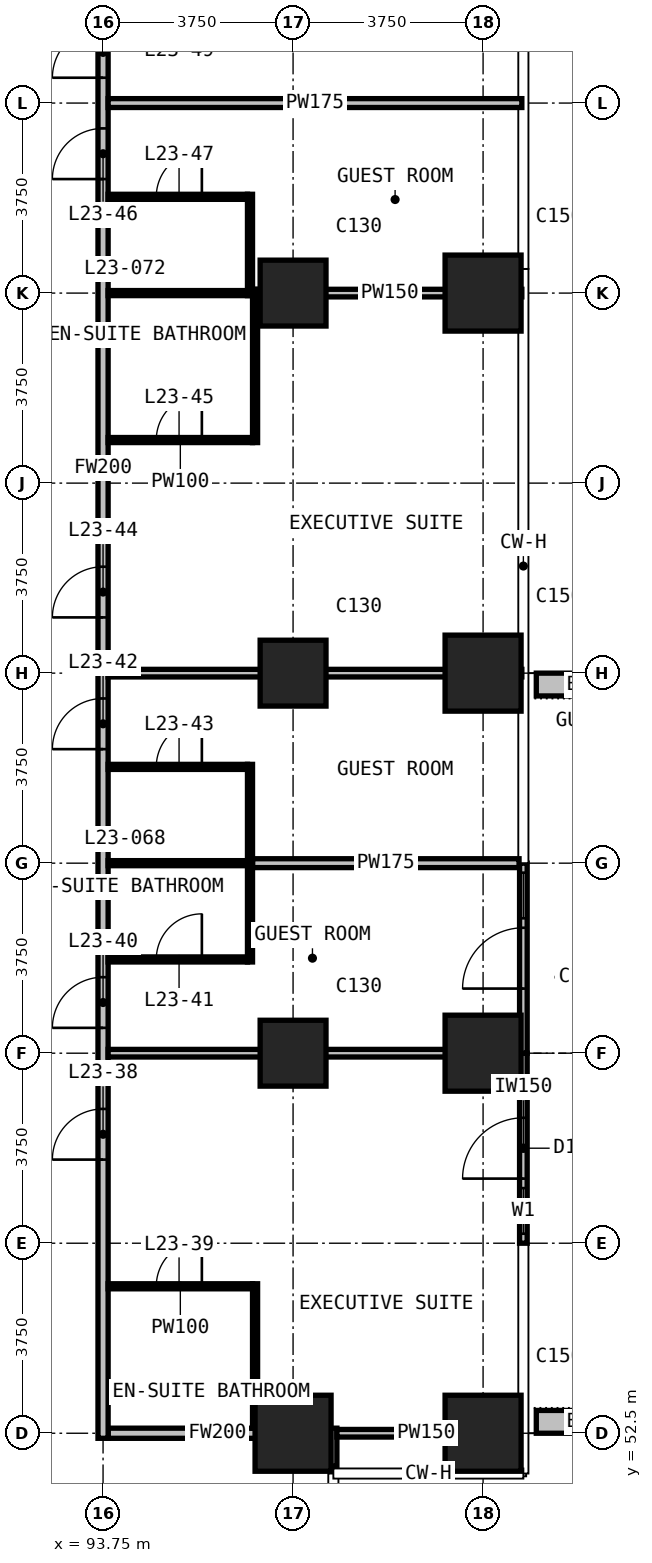
"""IFC4 building model, lengths in metres.
Left out: names, types, materials, properties, quantities, classifications, styles, units other than length and angle.
Written with IfcOpenShell. Run it as: python <this file> out.ifc"""

import sys

from ifc_helpers import new_model, si_unit, direction, frame, frame_2d, origin, origin_2d, place, context, subcontext, project, spatial, rectangle, extrude, element, fill, save


model = new_model("IFC4")
c1 = context("Model", 3, precision=1e-05, world=origin(), true_north=direction((0.0, 1.0)))
c2 = subcontext(c1, "Body", "Model", "MODEL_VIEW")
j1 = project(units=[si_unit("LENGTHUNIT", "METRE"), si_unit("PLANEANGLEUNIT", "RADIAN")], contexts=[c1])
p1 = place(None, origin())
s1 = spatial("IfcSite", under=j1, at=p1, CompositionType="ELEMENT")
p2 = place(p1, origin())
s2 = spatial("IfcBuilding", under=s1, at=p2, CompositionType="ELEMENT")
p3 = place(p2, frame((0.0, 0.0, 95.6)))
s3 = spatial("IfcBuildingStorey", under=s2, at=p3, CompositionType="ELEMENT", Elevation=95.6)
p4 = place(p3, frame((97.5, 52.5, 0.0), z_axis=(0.0, 0.0, 1.0), x_axis=(1.0, 0.0, 0.0)))
e1 = element("IfcColumn", 1, at=p4, inside=s3, PredefinedType="COLUMN", context=c2, shape_type="SweptSolid", body=[
    extrude(rectangle(XDim=1.5, YDim=1.5, at=origin_2d()), origin(), (0.0, 0.0, 1.0), 3.3),
])
for number, where, z_axis, x_axis in (
    (2, (97.5, 60.0, 0.0), (0.0, 0.0, 1.0), (1.0, 0.0, 0.0)),
    (3, (97.5, 67.5, 0.0), (0.0, 0.0, 1.0), (1.0, 0.0, 0.0)),
    (4, (97.5, 75.0, 0.0), (0.0, 0.0, 1.0), (1.0, 0.0, 0.0)),
):
    element("IfcColumn", number, at=place(p3, frame(where, z_axis=z_axis, x_axis=x_axis)), inside=s3, PredefinedType="COLUMN", context=c2, shape_type="SweptSolid", body=[
        extrude(rectangle(XDim=1.3, YDim=1.3, at=origin_2d()), origin(), (0.0, 0.0, 1.0), 3.3),
    ])
for number, where, z_axis, x_axis in (
    (5, (101.25, 52.5, 0.0), (0.0, 0.0, 1.0), (1.0, 0.0, 0.0)),
    (6, (101.25, 60.0, 0.0), (0.0, 0.0, 1.0), (1.0, 0.0, 0.0)),
    (7, (101.25, 67.5, 0.0), (0.0, 0.0, 1.0), (1.0, 0.0, 0.0)),
    (8, (101.25, 75.0, 0.0), (0.0, 0.0, 1.0), (1.0, 0.0, 0.0)),
):
    element("IfcColumn", number, at=place(p3, frame(where, z_axis=z_axis, x_axis=x_axis)), inside=s3, PredefinedType="COLUMN", context=c2, shape_type="SweptSolid", body=[
        extrude(rectangle(XDim=1.5, YDim=1.5, at=origin_2d()), origin(), (0.0, 0.0, 1.0), 3.3),
    ])
p5 = place(p3, frame((102.045, 56.25, 0.0), z_axis=(0.0, 0.0, 1.0), x_axis=(0.0, 1.0, 0.0)))
e9 = element("IfcWall", 9, at=p5, inside=s3, PredefinedType="SOLIDWALL", context=c2, shape_type="SweptSolid", body=[
    extrude(rectangle(XDim=3.75, YDim=0.15, at=frame_2d((1.875, 0.0))), origin(), (0.0, 0.0, 1.0), 3.0),
])
p6 = place(p5, frame((0.188, 0.0, 0.1)))
e10 = element("IfcOpeningElement", 10, at=p6, cuts=e9, PredefinedType="OPENING", context=c2, shape_type="SweptSolid", body=[
    extrude(rectangle(XDim=0.9, YDim=2.4, at=frame_2d((0.45, 1.2))), frame((0.0, 0.085, 0.0), z_axis=(0.0, -1.0, 0.0), x_axis=(1.0, 0.0, 0.0)), (0.0, 0.0, 1.0), 0.17),
])
p7 = place(p5, frame((1.275, 0.0, 0.0)))
e11 = element("IfcOpeningElement", 11, at=p7, cuts=e9, PredefinedType="OPENING", context=c2, shape_type="SweptSolid", body=[
    extrude(rectangle(XDim=1.2, YDim=2.4, at=frame_2d((0.6, 1.2))), frame((0.0, 0.085, 0.0), z_axis=(0.0, -1.0, 0.0), x_axis=(1.0, 0.0, 0.0)), (0.0, 0.0, 1.0), 0.17),
])
p8 = place(p3, frame((102.045, 60.0, 0.0), z_axis=(0.0, 0.0, 1.0), x_axis=(0.0, 1.0, 0.0)))
e12 = element("IfcWall", 12, at=p8, inside=s3, PredefinedType="SOLIDWALL", context=c2, shape_type="SweptSolid", body=[
    extrude(rectangle(XDim=3.75, YDim=0.15, at=frame_2d((1.875, 0.0))), origin(), (0.0, 0.0, 1.0), 3.0),
])
p9 = place(p8, frame((1.275, 0.0, 0.0)))
e13 = element("IfcOpeningElement", 13, at=p9, cuts=e12, PredefinedType="OPENING", context=c2, shape_type="SweptSolid", body=[
    extrude(rectangle(XDim=1.2, YDim=2.4, at=frame_2d((0.6, 1.2))), frame((0.0, 0.085, 0.0), z_axis=(0.0, -1.0, 0.0), x_axis=(1.0, 0.0, 0.0)), (0.0, 0.0, 1.0), 0.17),
])
p10 = place(p8, frame((2.663, 0.0, 0.1)))
e14 = element("IfcOpeningElement", 14, at=p10, cuts=e12, PredefinedType="OPENING", context=c2, shape_type="SweptSolid", body=[
    extrude(rectangle(XDim=0.9, YDim=2.4, at=frame_2d((0.45, 1.2))), frame((0.0, 0.085, 0.0), z_axis=(0.0, -1.0, 0.0), x_axis=(1.0, 0.0, 0.0)), (0.0, 0.0, 1.0), 0.17),
])
for number, where, z_axis, x_axis in (
    (15, (102.3, 52.725, 0.0), (0.0, 0.0, 1.0), (1.0, 0.0, 0.0)),
    (16, (102.3, 67.275, 0.0), (0.0, 0.0, 1.0), (1.0, 0.0, 0.0)),
):
    element("IfcWall", number, at=place(p3, frame(where, z_axis=z_axis, x_axis=x_axis)), inside=s3, PredefinedType="USERDEFINED", context=c2, shape_type="SweptSolid", body=[
        extrude(rectangle(XDim=2.35, YDim=0.45, at=frame_2d((1.175, 0.0))), origin(), (0.0, 0.0, 1.0), 1.1),
    ])
p11 = place(p3, frame((93.85, 52.5, 0.0), z_axis=(0.0, 0.0, 1.0), x_axis=(1.0, 0.0, 0.0)))
e17 = element("IfcWall", 17, at=p11, inside=s3, PredefinedType="PARTITIONING", context=c2, shape_type="SweptSolid", body=[
    extrude(rectangle(XDim=4.315, YDim=0.2, at=frame_2d((2.157, 0.0))), origin(), (0.0, 0.0, 1.0), 3.0),
])
p12 = place(p3, frame((93.75, 52.4, 0.0), z_axis=(0.0, 0.0, 1.0), x_axis=(0.0, 1.0, 0.0)))
e18 = element("IfcWall", 18, at=p12, inside=s3, PredefinedType="PARTITIONING", context=c2, shape_type="SweptSolid", body=[
    extrude(rectangle(XDim=38.31, YDim=0.2, at=frame_2d((19.155, 0.0))), origin(), (0.0, 0.0, 1.0), 3.0),
])
p13 = place(p12, frame((5.5, 0.0, 0.0)))
e19 = element("IfcOpeningElement", 19, at=p13, cuts=e18, PredefinedType="OPENING", context=c2, shape_type="SweptSolid", body=[
    extrude(rectangle(XDim=1.0, YDim=2.2, at=frame_2d((0.5, 1.1))), frame((0.0, 0.11, 0.0), z_axis=(0.0, -1.0, 0.0), x_axis=(1.0, 0.0, 0.0)), (0.0, 0.0, 1.0), 0.22),
])
p14 = place(p12, frame((8.1, 0.0, 0.0)))
e20 = element("IfcOpeningElement", 20, at=p14, cuts=e18, PredefinedType="OPENING", context=c2, shape_type="SweptSolid", body=[
    extrude(rectangle(XDim=1.0, YDim=2.2, at=frame_2d((0.5, 1.1))), frame((0.0, 0.11, 0.0), z_axis=(0.0, -1.0, 0.0), x_axis=(1.0, 0.0, 0.0)), (0.0, 0.0, 1.0), 0.22),
])
p15 = place(p12, frame((13.6, 0.0, 0.0)))
e21 = element("IfcOpeningElement", 21, at=p15, cuts=e18, PredefinedType="OPENING", context=c2, shape_type="SweptSolid", body=[
    extrude(rectangle(XDim=1.0, YDim=2.2, at=frame_2d((0.5, 1.1))), frame((0.0, 0.11, 0.0), z_axis=(0.0, -1.0, 0.0), x_axis=(1.0, 0.0, 0.0)), (0.0, 0.0, 1.0), 0.22),
])
p16 = place(p12, frame((16.2, 0.0, 0.0)))
e22 = element("IfcOpeningElement", 22, at=p16, cuts=e18, PredefinedType="OPENING", context=c2, shape_type="SweptSolid", body=[
    extrude(rectangle(XDim=1.0, YDim=2.2, at=frame_2d((0.5, 1.1))), frame((0.0, 0.11, 0.0), z_axis=(0.0, -1.0, 0.0), x_axis=(1.0, 0.0, 0.0)), (0.0, 0.0, 1.0), 0.22),
])
p17 = place(p12, frame((24.85, 0.0, 0.0)))
e23 = element("IfcOpeningElement", 23, at=p17, cuts=e18, PredefinedType="OPENING", context=c2, shape_type="SweptSolid", body=[
    extrude(rectangle(XDim=1.0, YDim=2.2, at=frame_2d((0.5, 1.1))), frame((0.0, 0.11, 0.0), z_axis=(0.0, -1.0, 0.0), x_axis=(1.0, 0.0, 0.0)), (0.0, 0.0, 1.0), 0.22),
])
p18 = place(p12, frame((26.85, 0.0, 0.0)))
e24 = element("IfcOpeningElement", 24, at=p18, cuts=e18, PredefinedType="OPENING", context=c2, shape_type="SweptSolid", body=[
    extrude(rectangle(XDim=1.0, YDim=2.2, at=frame_2d((0.5, 1.1))), frame((0.0, 0.11, 0.0), z_axis=(0.0, -1.0, 0.0), x_axis=(1.0, 0.0, 0.0)), (0.0, 0.0, 1.0), 0.22),
])
p19 = place(p12, frame((31.55, 0.0, 0.0)))
e25 = element("IfcOpeningElement", 25, at=p19, cuts=e18, PredefinedType="OPENING", context=c2, shape_type="SweptSolid", body=[
    extrude(rectangle(XDim=0.9, YDim=2.2, at=frame_2d((0.45, 1.1))), frame((0.0, 0.11, 0.0), z_axis=(0.0, -1.0, 0.0), x_axis=(1.0, 0.0, 0.0)), (0.0, 0.0, 1.0), 0.22),
])
p20 = place(p12, frame((35.65, 0.0, 0.0)))
e26 = element("IfcOpeningElement", 26, at=p20, cuts=e18, PredefinedType="OPENING", context=c2, shape_type="SweptSolid", body=[
    extrude(rectangle(XDim=0.9, YDim=2.2, at=frame_2d((0.45, 1.1))), frame((0.0, 0.11, 0.0), z_axis=(0.0, -1.0, 0.0), x_axis=(1.0, 0.0, 0.0)), (0.0, 0.0, 1.0), 0.22),
])
p21 = place(p3, frame((98.265, 51.855, 0.0), z_axis=(0.0, 0.0, 1.0), x_axis=(0.0, 1.0, 0.0)))
e27 = element("IfcWall", 27, at=p21, inside=s3, PredefinedType="PARTITIONING", context=c2, shape_type="SweptSolid", body=[
    extrude(rectangle(XDim=0.745, YDim=0.2, at=frame_2d((0.373, 0.0))), origin(), (0.0, 0.0, 1.0), 3.0),
])
p22 = place(p3, frame((96.7, 63.75, 0.0), z_axis=(0.0, 0.0, 1.0), x_axis=(1.0, 0.0, 0.0)))
e28 = element("IfcWall", 28, at=p22, inside=s3, PredefinedType="PARTITIONING", context=c2, shape_type="SweptSolid", body=[
    extrude(rectangle(XDim=5.26, YDim=0.175, at=frame_2d((2.63, 0.0))), origin(), (0.0, 0.0, 1.0), 3.0),
])
p23 = place(p3, frame((93.85, 78.75, 0.0), z_axis=(0.0, 0.0, 1.0), x_axis=(1.0, 0.0, 0.0)))
e29 = element("IfcWall", 29, at=p23, inside=s3, PredefinedType="PARTITIONING", context=c2, shape_type="SweptSolid", body=[
    extrude(rectangle(XDim=8.165, YDim=0.175, at=frame_2d((4.083, 0.0))), origin(), (0.0, 0.0, 1.0), 3.0),
])
p24 = place(p3, frame((98.365, 52.5, 0.0), z_axis=(0.0, 0.0, 1.0), x_axis=(1.0, 0.0, 0.0)))
e30 = element("IfcWall", 30, at=p24, inside=s3, PredefinedType="PARTITIONING", context=c2, shape_type="SweptSolid", body=[
    extrude(rectangle(XDim=3.53, YDim=0.15, at=frame_2d((1.765, 0.0))), origin(), (0.0, 0.0, 1.0), 3.0),
])
p25 = place(p3, frame((93.85, 60.0, 0.0), z_axis=(0.0, 0.0, 1.0), x_axis=(1.0, 0.0, 0.0)))
e31 = element("IfcWall", 31, at=p25, inside=s3, PredefinedType="PARTITIONING", context=c2, shape_type="SweptSolid", body=[
    extrude(rectangle(XDim=8.11, YDim=0.15, at=frame_2d((4.055, 0.0))), origin(), (0.0, 0.0, 1.0), 3.0),
])
p26 = place(p3, frame((93.85, 67.5, 0.0), z_axis=(0.0, 0.0, 1.0), x_axis=(1.0, 0.0, 0.0)))
e32 = element("IfcWall", 32, at=p26, inside=s3, PredefinedType="PARTITIONING", context=c2, shape_type="SweptSolid", body=[
    extrude(rectangle(XDim=8.165, YDim=0.15, at=frame_2d((4.083, 0.0))), origin(), (0.0, 0.0, 1.0), 3.0),
])
p27 = place(p3, frame((96.8, 75.0, 0.0), z_axis=(0.0, 0.0, 1.0), x_axis=(1.0, 0.0, 0.0)))
e33 = element("IfcWall", 33, at=p27, inside=s3, PredefinedType="PARTITIONING", context=c2, shape_type="SweptSolid", body=[
    extrude(rectangle(XDim=5.215, YDim=0.15, at=frame_2d((2.607, 0.0))), origin(), (0.0, 0.0, 1.0), 3.0),
])
p28 = place(p3, frame((93.85, 55.4, 0.0), z_axis=(0.0, 0.0, 1.0), x_axis=(1.0, 0.0, 0.0)))
e34 = element("IfcWall", 34, at=p28, inside=s3, PredefinedType="PARTITIONING", context=c2, shape_type="SweptSolid", body=[
    extrude(rectangle(XDim=2.85, YDim=0.1, at=frame_2d((1.425, 0.0))), origin(), (0.0, 0.0, 1.0), 3.0),
])
p29 = place(p28, frame((0.95, 0.0, 0.0)))
e35 = element("IfcOpeningElement", 35, at=p29, cuts=e34, PredefinedType="OPENING", context=c2, shape_type="SweptSolid", body=[
    extrude(rectangle(XDim=0.9, YDim=2.2, at=frame_2d((0.45, 1.1))), frame((0.0, 0.06, 0.0), z_axis=(0.0, -1.0, 0.0), x_axis=(1.0, 0.0, 0.0)), (0.0, 0.0, 1.0), 0.12),
])
p30 = place(p3, frame((93.85, 61.85, 0.0), z_axis=(0.0, 0.0, 1.0), x_axis=(1.0, 0.0, 0.0)))
e36 = element("IfcWall", 36, at=p30, inside=s3, PredefinedType="PARTITIONING", context=c2, shape_type="SweptSolid", body=[
    extrude(rectangle(XDim=2.75, YDim=0.1, at=frame_2d((1.375, 0.0))), origin(), (0.0, 0.0, 1.0), 3.0),
])
p31 = place(p30, frame((0.95, 0.0, 0.0)))
e37 = element("IfcOpeningElement", 37, at=p31, cuts=e36, PredefinedType="OPENING", context=c2, shape_type="SweptSolid", body=[
    extrude(rectangle(XDim=0.9, YDim=2.2, at=frame_2d((0.45, 1.1))), frame((0.0, 0.06, 0.0), z_axis=(0.0, -1.0, 0.0), x_axis=(1.0, 0.0, 0.0)), (0.0, 0.0, 1.0), 0.12),
])
p32 = place(p3, frame((93.85, 63.75, 0.0), z_axis=(0.0, 0.0, 1.0), x_axis=(1.0, 0.0, 0.0)))
e38 = element("IfcWall", 38, at=p32, inside=s3, PredefinedType="PARTITIONING", context=c2, shape_type="SweptSolid", body=[
    extrude(rectangle(XDim=2.75, YDim=0.1, at=frame_2d((1.375, 0.0))), origin(), (0.0, 0.0, 1.0), 3.0),
])
p33 = place(p3, frame((93.85, 65.65, 0.0), z_axis=(0.0, 0.0, 1.0), x_axis=(1.0, 0.0, 0.0)))
e39 = element("IfcWall", 39, at=p33, inside=s3, PredefinedType="PARTITIONING", context=c2, shape_type="SweptSolid", body=[
    extrude(rectangle(XDim=2.75, YDim=0.1, at=frame_2d((1.375, 0.0))), origin(), (0.0, 0.0, 1.0), 3.0),
])
p34 = place(p33, frame((0.95, 0.0, 0.0)))
e40 = element("IfcOpeningElement", 40, at=p34, cuts=e39, PredefinedType="OPENING", context=c2, shape_type="SweptSolid", body=[
    extrude(rectangle(XDim=0.9, YDim=2.2, at=frame_2d((0.45, 1.1))), frame((0.0, 0.06, 0.0), z_axis=(0.0, -1.0, 0.0), x_axis=(1.0, 0.0, 0.0)), (0.0, 0.0, 1.0), 0.12),
])
p35 = place(p3, frame((93.85, 72.1, 0.0), z_axis=(0.0, 0.0, 1.0), x_axis=(1.0, 0.0, 0.0)))
e41 = element("IfcWall", 41, at=p35, inside=s3, PredefinedType="PARTITIONING", context=c2, shape_type="SweptSolid", body=[
    extrude(rectangle(XDim=2.85, YDim=0.1, at=frame_2d((1.425, 0.0))), origin(), (0.0, 0.0, 1.0), 3.0),
])
p36 = place(p35, frame((0.95, 0.0, 0.0)))
e42 = element("IfcOpeningElement", 42, at=p36, cuts=e41, PredefinedType="OPENING", context=c2, shape_type="SweptSolid", body=[
    extrude(rectangle(XDim=0.9, YDim=2.2, at=frame_2d((0.45, 1.1))), frame((0.0, 0.06, 0.0), z_axis=(0.0, -1.0, 0.0), x_axis=(1.0, 0.0, 0.0)), (0.0, 0.0, 1.0), 0.12),
])
p37 = place(p3, frame((93.85, 75.0, 0.0), z_axis=(0.0, 0.0, 1.0), x_axis=(1.0, 0.0, 0.0)))
e43 = element("IfcWall", 43, at=p37, inside=s3, PredefinedType="PARTITIONING", context=c2, shape_type="SweptSolid", body=[
    extrude(rectangle(XDim=2.75, YDim=0.1, at=frame_2d((1.375, 0.0))), origin(), (0.0, 0.0, 1.0), 3.0),
])
p38 = place(p3, frame((93.85, 76.9, 0.0), z_axis=(0.0, 0.0, 1.0), x_axis=(1.0, 0.0, 0.0)))
e44 = element("IfcWall", 44, at=p38, inside=s3, PredefinedType="PARTITIONING", context=c2, shape_type="SweptSolid", body=[
    extrude(rectangle(XDim=2.75, YDim=0.1, at=frame_2d((1.375, 0.0))), origin(), (0.0, 0.0, 1.0), 3.0),
])
p39 = place(p38, frame((0.95, 0.0, 0.0)))
e45 = element("IfcOpeningElement", 45, at=p39, cuts=e44, PredefinedType="OPENING", context=c2, shape_type="SweptSolid", body=[
    extrude(rectangle(XDim=0.9, YDim=2.2, at=frame_2d((0.45, 1.1))), frame((0.0, 0.06, 0.0), z_axis=(0.0, -1.0, 0.0), x_axis=(1.0, 0.0, 0.0)), (0.0, 0.0, 1.0), 0.12),
])
p40 = place(p3, frame((96.65, 61.8, 0.0), z_axis=(0.0, 0.0, 1.0), x_axis=(0.0, 1.0, 0.0)))
e46 = element("IfcWall", 46, at=p40, inside=s3, PredefinedType="PARTITIONING", context=c2, shape_type="SweptSolid", body=[
    extrude(rectangle(XDim=3.9, YDim=0.1, at=frame_2d((1.95, 0.0))), origin(), (0.0, 0.0, 1.0), 3.0),
])
p41 = place(p3, frame((96.65, 74.95, 0.0), z_axis=(0.0, 0.0, 1.0), x_axis=(0.0, 1.0, 0.0)))
e47 = element("IfcWall", 47, at=p41, inside=s3, PredefinedType="PARTITIONING", context=c2, shape_type="SweptSolid", body=[
    extrude(rectangle(XDim=2.0, YDim=0.1, at=frame_2d((1.0, 0.0))), origin(), (0.0, 0.0, 1.0), 3.0),
])
p42 = place(p3, frame((96.75, 52.6, 0.0), z_axis=(0.0, 0.0, 1.0), x_axis=(0.0, 1.0, 0.0)))
e48 = element("IfcWall", 48, at=p42, inside=s3, PredefinedType="PARTITIONING", context=c2, shape_type="SweptSolid", body=[
    extrude(rectangle(XDim=2.85, YDim=0.1, at=frame_2d((1.425, 0.0))), origin(), (0.0, 0.0, 1.0), 3.0),
])
p43 = place(p3, frame((96.75, 72.05, 0.0), z_axis=(0.0, 0.0, 1.0), x_axis=(0.0, 1.0, 0.0)))
e49 = element("IfcWall", 49, at=p43, inside=s3, PredefinedType="PARTITIONING", context=c2, shape_type="SweptSolid", body=[
    extrude(rectangle(XDim=3.025, YDim=0.1, at=frame_2d((1.512, 0.0))), origin(), (0.0, 0.0, 1.0), 3.0),
])
p44 = place(p6, origin())
e50 = element("IfcWindow", 50, at=p44, inside=s3, PartitioningType="SINGLE_PANEL", PredefinedType="WINDOW", context=c2, shape_type="SweptSolid", body=[
    extrude(rectangle(XDim=0.9, YDim=2.4, at=frame_2d((0.45, 1.2))), frame((0.0, 0.03, 0.0), z_axis=(0.0, -1.0, 0.0), x_axis=(1.0, 0.0, 0.0)), (0.0, 0.0, 1.0), 0.06),
])
fill(e10, e50)
p45 = place(p7, origin())
e51 = element("IfcDoor", 51, at=p45, inside=s3, OperationType="SINGLE_SWING_LEFT", PredefinedType="DOOR", context=c2, shape_type="SweptSolid", body=[
    extrude(rectangle(XDim=1.2, YDim=2.4, at=frame_2d((0.6, 1.2))), frame((0.0, 0.025, 0.0), z_axis=(0.0, -1.0, 0.0), x_axis=(1.0, 0.0, 0.0)), (0.0, 0.0, 1.0), 0.05),
])
fill(e11, e51)
p46 = place(p9, origin())
e52 = element("IfcDoor", 52, at=p46, inside=s3, OperationType="SINGLE_SWING_LEFT", PredefinedType="DOOR", context=c2, shape_type="SweptSolid", body=[
    extrude(rectangle(XDim=1.2, YDim=2.4, at=frame_2d((0.6, 1.2))), frame((0.0, 0.025, 0.0), z_axis=(0.0, -1.0, 0.0), x_axis=(1.0, 0.0, 0.0)), (0.0, 0.0, 1.0), 0.05),
])
fill(e13, e52)
p47 = place(p10, origin())
e53 = element("IfcWindow", 53, at=p47, inside=s3, PartitioningType="SINGLE_PANEL", PredefinedType="WINDOW", context=c2, shape_type="SweptSolid", body=[
    extrude(rectangle(XDim=0.9, YDim=2.4, at=frame_2d((0.45, 1.2))), frame((0.0, 0.03, 0.0), z_axis=(0.0, -1.0, 0.0), x_axis=(1.0, 0.0, 0.0)), (0.0, 0.0, 1.0), 0.06),
])
fill(e14, e53)
p48 = place(p13, origin())
e54 = element("IfcDoor", 54, at=p48, inside=s3, OperationType="SINGLE_SWING_LEFT", PredefinedType="DOOR", context=c2, shape_type="SweptSolid", body=[
    extrude(rectangle(XDim=1.0, YDim=2.2, at=frame_2d((0.5, 1.1))), frame((0.0, 0.025, 0.0), z_axis=(0.0, -1.0, 0.0), x_axis=(1.0, 0.0, 0.0)), (0.0, 0.0, 1.0), 0.05),
])
fill(e19, e54)
p49 = place(p29, origin())
e55 = element("IfcDoor", 55, at=p49, inside=s3, OperationType="SINGLE_SWING_RIGHT", PredefinedType="DOOR", context=c2, shape_type="SweptSolid", body=[
    extrude(rectangle(XDim=0.9, YDim=2.2, at=frame_2d((0.45, 1.1))), frame((0.0, 0.025, 0.0), z_axis=(0.0, -1.0, 0.0), x_axis=(1.0, 0.0, 0.0)), (0.0, 0.0, 1.0), 0.05),
])
fill(e35, e55)
p50 = place(p14, origin())
e56 = element("IfcDoor", 56, at=p50, inside=s3, OperationType="SINGLE_SWING_RIGHT", PredefinedType="DOOR", context=c2, shape_type="SweptSolid", body=[
    extrude(rectangle(XDim=1.0, YDim=2.2, at=frame_2d((0.5, 1.1))), frame((0.0, 0.025, 0.0), z_axis=(0.0, -1.0, 0.0), x_axis=(1.0, 0.0, 0.0)), (0.0, 0.0, 1.0), 0.05),
])
fill(e20, e56)
p51 = place(p31, origin())
e57 = element("IfcDoor", 57, at=p51, inside=s3, OperationType="SINGLE_SWING_RIGHT", PredefinedType="DOOR", context=c2, shape_type="SweptSolid", body=[
    extrude(rectangle(XDim=0.9, YDim=2.2, at=frame_2d((0.45, 1.1))), frame((0.0, 0.025, 0.0), z_axis=(0.0, -1.0, 0.0), x_axis=(1.0, 0.0, 0.0)), (0.0, 0.0, 1.0), 0.05),
])
fill(e37, e57)
p52 = place(p15, origin())
e58 = element("IfcDoor", 58, at=p52, inside=s3, OperationType="SINGLE_SWING_RIGHT", PredefinedType="DOOR", context=c2, shape_type="SweptSolid", body=[
    extrude(rectangle(XDim=1.0, YDim=2.2, at=frame_2d((0.5, 1.1))), frame((0.0, 0.025, 0.0), z_axis=(0.0, -1.0, 0.0), x_axis=(1.0, 0.0, 0.0)), (0.0, 0.0, 1.0), 0.05),
])
fill(e21, e58)
p53 = place(p34, origin())
e59 = element("IfcDoor", 59, at=p53, inside=s3, OperationType="SINGLE_SWING_RIGHT", PredefinedType="DOOR", context=c2, shape_type="SweptSolid", body=[
    extrude(rectangle(XDim=0.9, YDim=2.2, at=frame_2d((0.45, 1.1))), frame((0.0, 0.025, 0.0), z_axis=(0.0, -1.0, 0.0), x_axis=(1.0, 0.0, 0.0)), (0.0, 0.0, 1.0), 0.05),
])
fill(e40, e59)
p54 = place(p16, origin())
e60 = element("IfcDoor", 60, at=p54, inside=s3, OperationType="SINGLE_SWING_LEFT", PredefinedType="DOOR", context=c2, shape_type="SweptSolid", body=[
    extrude(rectangle(XDim=1.0, YDim=2.2, at=frame_2d((0.5, 1.1))), frame((0.0, 0.025, 0.0), z_axis=(0.0, -1.0, 0.0), x_axis=(1.0, 0.0, 0.0)), (0.0, 0.0, 1.0), 0.05),
])
fill(e22, e60)
p55 = place(p36, origin())
e61 = element("IfcDoor", 61, at=p55, inside=s3, OperationType="SINGLE_SWING_RIGHT", PredefinedType="DOOR", context=c2, shape_type="SweptSolid", body=[
    extrude(rectangle(XDim=0.9, YDim=2.2, at=frame_2d((0.45, 1.1))), frame((0.0, 0.025, 0.0), z_axis=(0.0, -1.0, 0.0), x_axis=(1.0, 0.0, 0.0)), (0.0, 0.0, 1.0), 0.05),
])
fill(e42, e61)
p56 = place(p17, origin())
e62 = element("IfcDoor", 62, at=p56, inside=s3, OperationType="SINGLE_SWING_RIGHT", PredefinedType="DOOR", context=c2, shape_type="SweptSolid", body=[
    extrude(rectangle(XDim=1.0, YDim=2.2, at=frame_2d((0.5, 1.1))), frame((0.0, 0.025, 0.0), z_axis=(0.0, -1.0, 0.0), x_axis=(1.0, 0.0, 0.0)), (0.0, 0.0, 1.0), 0.05),
])
fill(e23, e62)
p57 = place(p39, origin())
e63 = element("IfcDoor", 63, at=p57, inside=s3, OperationType="SINGLE_SWING_RIGHT", PredefinedType="DOOR", context=c2, shape_type="SweptSolid", body=[
    extrude(rectangle(XDim=0.9, YDim=2.2, at=frame_2d((0.45, 1.1))), frame((0.0, 0.025, 0.0), z_axis=(0.0, -1.0, 0.0), x_axis=(1.0, 0.0, 0.0)), (0.0, 0.0, 1.0), 0.05),
])
fill(e45, e63)
p58 = place(p18, origin())
e64 = element("IfcDoor", 64, at=p58, inside=s3, OperationType="SINGLE_SWING_LEFT", PredefinedType="DOOR", context=c2, shape_type="SweptSolid", body=[
    extrude(rectangle(XDim=1.0, YDim=2.2, at=frame_2d((0.5, 1.1))), frame((0.0, 0.025, 0.0), z_axis=(0.0, -1.0, 0.0), x_axis=(1.0, 0.0, 0.0)), (0.0, 0.0, 1.0), 0.05),
])
fill(e24, e64)
save(model, sys.argv[1])
